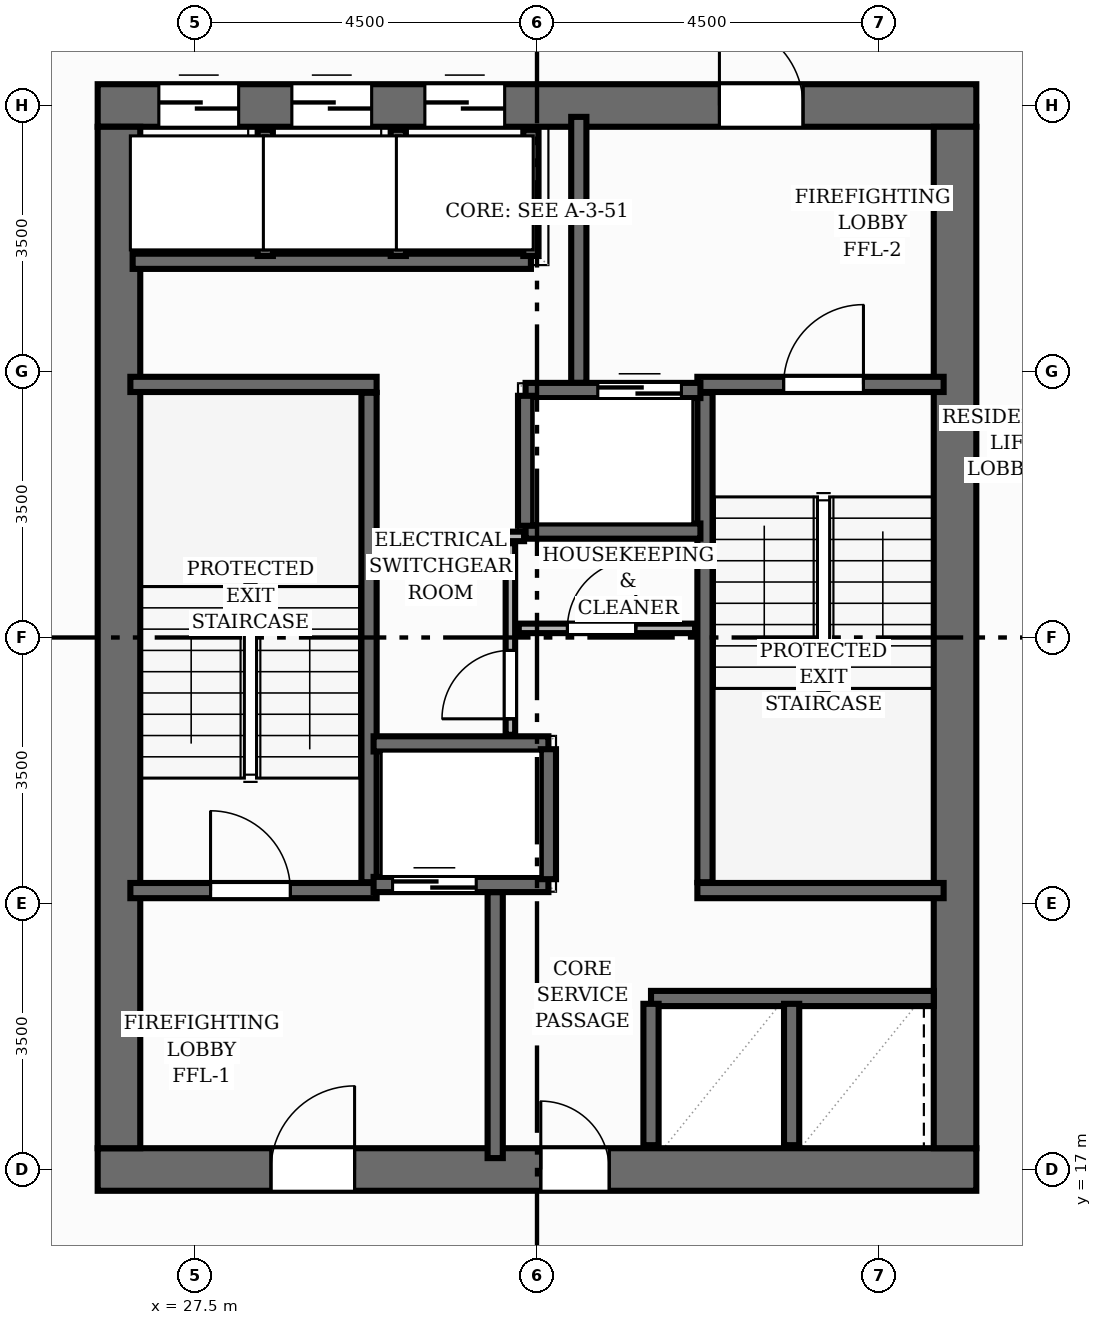
"""IFC4 building model, lengths in metres.
Left out: names, types, materials, properties, quantities, classifications, styles, units other than length and angle.
Written with IfcOpenShell. Run it as: python <this file> out.ifc"""

import sys

from ifc_helpers import new_model, si_unit, direction, frame, frame_2d, origin, place, context, subcontext, project, spatial, rectangle, extrude, element, fill, save


model = new_model("IFC4")
c1 = context("Model", 3, precision=1e-05, world=origin(), true_north=direction((0.0, 1.0)))
c2 = subcontext(c1, "Body", "Model", "MODEL_VIEW")
j1 = project(units=[si_unit("LENGTHUNIT", "METRE"), si_unit("PLANEANGLEUNIT", "RADIAN")], contexts=[c1])
p1 = place(None, origin())
s1 = spatial("IfcSite", under=j1, at=p1, CompositionType="ELEMENT")
p2 = place(p1, origin())
s2 = spatial("IfcBuilding", under=s1, at=p2, CompositionType="ELEMENT")
p3 = place(p2, frame((0.0, 0.0, 211.04)))
s3 = spatial("IfcBuildingStorey", under=s2, at=p3, CompositionType="ELEMENT", Elevation=211.04)
p4 = place(p3, frame((26.22, 17.0, 0.0), z_axis=(0.0, 0.0, 1.0), x_axis=(1.0, 0.0, 0.0)))
e1 = element("IfcWall", 1, at=p4, inside=s3, PredefinedType="SHEAR", context=c2, shape_type="SweptSolid", body=[
    extrude(rectangle(XDim=11.56, YDim=0.56, at=frame_2d((5.78, 0.0))), origin(), (0.0, 0.0, 1.0), 3.2),
])
p5 = place(p4, frame((2.28, 0.0, 0.0)))
e2 = element("IfcOpeningElement", 2, at=p5, cuts=e1, PredefinedType="OPENING", context=c2, shape_type="SweptSolid", body=[
    extrude(rectangle(XDim=1.1, YDim=2.15, at=frame_2d((0.55, 1.075))), frame((0.0, 0.29, 0.0), z_axis=(0.0, -1.0, 0.0), x_axis=(1.0, 0.0, 0.0)), (0.0, 0.0, 1.0), 0.58),
])
p6 = place(p4, frame((5.83, 0.0, 0.0)))
e3 = element("IfcOpeningElement", 3, at=p6, cuts=e1, PredefinedType="OPENING", context=c2, shape_type="SweptSolid", body=[
    extrude(rectangle(XDim=0.9, YDim=2.1, at=frame_2d((0.45, 1.05))), frame((0.0, 0.29, 0.0), z_axis=(0.0, -1.0, 0.0), x_axis=(1.0, 0.0, 0.0)), (0.0, 0.0, 1.0), 0.58),
])
p7 = place(p3, frame((26.22, 31.0, 0.0), z_axis=(0.0, 0.0, 1.0), x_axis=(1.0, 0.0, 0.0)))
e4 = element("IfcWall", 4, at=p7, inside=s3, PredefinedType="SHEAR", context=c2, shape_type="SweptSolid", body=[
    extrude(rectangle(XDim=11.56, YDim=0.56, at=frame_2d((5.78, 0.0))), origin(), (0.0, 0.0, 1.0), 3.2),
])
p8 = place(p7, frame((8.18, 0.0, 0.0)))
e5 = element("IfcOpeningElement", 5, at=p8, cuts=e4, PredefinedType="OPENING", context=c2, shape_type="SweptSolid", body=[
    extrude(rectangle(XDim=1.1, YDim=2.15, at=frame_2d((0.55, 1.075))), frame((0.0, 0.29, 0.0), z_axis=(0.0, -1.0, 0.0), x_axis=(1.0, 0.0, 0.0)), (0.0, 0.0, 1.0), 0.58),
])
p9 = place(p7, frame((0.805, 0.0, 0.0)))
e6 = element("IfcOpeningElement", 6, at=p9, cuts=e4, PredefinedType="OPENING", context=c2, shape_type="SweptSolid", body=[
    extrude(rectangle(XDim=1.05, YDim=2.15, at=frame_2d((0.525, 1.075))), frame((0.0, 0.29, 0.0), z_axis=(0.0, -1.0, 0.0), x_axis=(1.0, 0.0, 0.0)), (0.0, 0.0, 1.0), 0.58),
])
p10 = place(p7, frame((2.555, 0.0, 0.0)))
e7 = element("IfcOpeningElement", 7, at=p10, cuts=e4, PredefinedType="OPENING", context=c2, shape_type="SweptSolid", body=[
    extrude(rectangle(XDim=1.05, YDim=2.15, at=frame_2d((0.525, 1.075))), frame((0.0, 0.29, 0.0), z_axis=(0.0, -1.0, 0.0), x_axis=(1.0, 0.0, 0.0)), (0.0, 0.0, 1.0), 0.58),
])
p11 = place(p7, frame((4.305, 0.0, 0.0)))
e8 = element("IfcOpeningElement", 8, at=p11, cuts=e4, PredefinedType="OPENING", context=c2, shape_type="SweptSolid", body=[
    extrude(rectangle(XDim=1.05, YDim=2.15, at=frame_2d((0.525, 1.075))), frame((0.0, 0.29, 0.0), z_axis=(0.0, -1.0, 0.0), x_axis=(1.0, 0.0, 0.0)), (0.0, 0.0, 1.0), 0.58),
])
for number, where, z_axis, x_axis in (
    (9, (26.5, 17.28, 0.0), (0.0, 0.0, 1.0), (0.0, 1.0, 0.0)),
    (10, (37.5, 17.28, 0.0), (0.0, 0.0, 1.0), (0.0, 1.0, 0.0)),
):
    element("IfcWall", number, at=place(p3, frame(where, z_axis=z_axis, x_axis=x_axis)), inside=s3, PredefinedType="SHEAR", context=c2, shape_type="SweptSolid", body=[
        extrude(rectangle(XDim=13.44, YDim=0.56, at=frame_2d((6.72, 0.0))), origin(), (0.0, 0.0, 1.0), 3.2),
    ])
p12 = place(p3, frame((29.79, 20.78, 0.0), z_axis=(0.0, 0.0, 1.0), x_axis=(0.0, 1.0, 0.0)))
e11 = element("IfcWall", 11, at=p12, inside=s3, PredefinedType="SHEAR", context=c2, shape_type="SweptSolid", body=[
    extrude(rectangle(XDim=6.44, YDim=0.2, at=frame_2d((3.22, 0.0))), origin(), (0.0, 0.0, 1.0), 3.2),
])
p13 = place(p3, frame((26.65, 27.33, 0.0), z_axis=(0.0, 0.0, 1.0), x_axis=(1.0, 0.0, 0.0)))
e12 = element("IfcWall", 12, at=p13, inside=s3, PredefinedType="SHEAR", context=c2, shape_type="SweptSolid", body=[
    extrude(rectangle(XDim=3.24, YDim=0.2, at=frame_2d((1.62, 0.0))), origin(), (0.0, 0.0, 1.0), 3.2),
])
p14 = place(p3, frame((26.65, 20.67, 0.0), z_axis=(0.0, 0.0, 1.0), x_axis=(1.0, 0.0, 0.0)))
e13 = element("IfcWall", 13, at=p14, inside=s3, PredefinedType="SHEAR", context=c2, shape_type="SweptSolid", body=[
    extrude(rectangle(XDim=3.24, YDim=0.2, at=frame_2d((1.62, 0.0))), origin(), (0.0, 0.0, 1.0), 3.2),
])
p15 = place(p14, frame((1.055, 0.0, 0.0)))
e14 = element("IfcOpeningElement", 14, at=p15, cuts=e13, PredefinedType="OPENING", context=c2, shape_type="SweptSolid", body=[
    extrude(rectangle(XDim=1.05, YDim=2.15, at=frame_2d((0.525, 1.075))), frame((0.0, 0.11, 0.0), z_axis=(0.0, -1.0, 0.0), x_axis=(1.0, 0.0, 0.0)), (0.0, 0.0, 1.0), 0.22),
])
p16 = place(p3, frame((34.21, 20.78, 0.0), z_axis=(0.0, 0.0, 1.0), x_axis=(0.0, 1.0, 0.0)))
e15 = element("IfcWall", 15, at=p16, inside=s3, PredefinedType="SHEAR", context=c2, shape_type="SweptSolid", body=[
    extrude(rectangle(XDim=6.44, YDim=0.2, at=frame_2d((3.22, 0.0))), origin(), (0.0, 0.0, 1.0), 3.2),
])
p17 = place(p3, frame((34.11, 20.67, 0.0), z_axis=(0.0, 0.0, 1.0), x_axis=(1.0, 0.0, 0.0)))
e16 = element("IfcWall", 16, at=p17, inside=s3, PredefinedType="SHEAR", context=c2, shape_type="SweptSolid", body=[
    extrude(rectangle(XDim=3.24, YDim=0.2, at=frame_2d((1.62, 0.0))), origin(), (0.0, 0.0, 1.0), 3.2),
])
p18 = place(p3, frame((34.11, 27.33, 0.0), z_axis=(0.0, 0.0, 1.0), x_axis=(1.0, 0.0, 0.0)))
e17 = element("IfcWall", 17, at=p18, inside=s3, PredefinedType="SHEAR", context=c2, shape_type="SweptSolid", body=[
    extrude(rectangle(XDim=3.24, YDim=0.2, at=frame_2d((1.62, 0.0))), origin(), (0.0, 0.0, 1.0), 3.2),
])
p19 = place(p18, frame((1.135, 0.0, 0.0)))
e18 = element("IfcOpeningElement", 18, at=p19, cuts=e17, PredefinedType="OPENING", context=c2, shape_type="SweptSolid", body=[
    extrude(rectangle(XDim=1.05, YDim=2.15, at=frame_2d((0.525, 1.075))), frame((0.0, 0.11, 0.0), z_axis=(0.0, -1.0, 0.0), x_axis=(1.0, 0.0, 0.0)), (0.0, 0.0, 1.0), 0.22),
])
for number, where, z_axis, x_axis in (
    (19, (31.45, 17.15, 0.0), (0.0, 0.0, 1.0), (0.0, 1.0, 0.0)),
    (20, (32.55, 27.35, 0.0), (0.0, 0.0, 1.0), (0.0, 1.0, 0.0)),
):
    element("IfcWall", number, at=place(p3, frame(where, z_axis=z_axis, x_axis=x_axis)), inside=s3, PredefinedType="SHEAR", context=c2, shape_type="SweptSolid", body=[
        extrude(rectangle(XDim=3.5, YDim=0.2, at=frame_2d((1.75, 0.0))), origin(), (0.0, 0.0, 1.0), 3.2),
    ])
p20 = place(p3, frame((29.85, 20.75, 0.0), z_axis=(0.0, 0.0, 1.0), x_axis=(1.0, 0.0, 0.0)))
e21 = element("IfcWall", 21, at=p20, inside=s3, PredefinedType="SHEAR", context=c2, shape_type="SweptSolid", body=[
    extrude(rectangle(XDim=2.3, YDim=0.2, at=frame_2d((1.15, 0.0))), origin(), (0.0, 0.0, 1.0), 3.2),
])
p21 = place(p20, frame((0.25, 0.0, 0.0)))
e22 = element("IfcOpeningElement", 22, at=p21, cuts=e21, PredefinedType="OPENING", context=c2, shape_type="SweptSolid", body=[
    extrude(rectangle(XDim=1.1, YDim=2.15, at=frame_2d((0.55, 1.075))), frame((0.0, 0.11, 0.0), z_axis=(0.0, -1.0, 0.0), x_axis=(1.0, 0.0, 0.0)), (0.0, 0.0, 1.0), 0.22),
])
p22 = place(p3, frame((29.85, 22.6, 0.0), z_axis=(0.0, 0.0, 1.0), x_axis=(1.0, 0.0, 0.0)))
e23 = element("IfcWall", 23, at=p22, inside=s3, PredefinedType="SHEAR", context=c2, shape_type="SweptSolid", body=[
    extrude(rectangle(XDim=2.3, YDim=0.2, at=frame_2d((1.15, 0.0))), origin(), (0.0, 0.0, 1.0), 3.2),
])
p23 = place(p3, frame((32.15, 20.82, 0.0), z_axis=(0.0, 0.0, 1.0), x_axis=(0.0, 1.0, 0.0)))
e24 = element("IfcWall", 24, at=p23, inside=s3, PredefinedType="SHEAR", context=c2, shape_type="SweptSolid", body=[
    extrude(rectangle(XDim=1.71, YDim=0.2, at=frame_2d((0.855, 0.0))), origin(), (0.0, 0.0, 1.0), 3.2),
])
p24 = place(p3, frame((31.85, 27.25, 0.0), z_axis=(0.0, 0.0, 1.0), x_axis=(1.0, 0.0, 0.0)))
e25 = element("IfcWall", 25, at=p24, inside=s3, PredefinedType="SHEAR", context=c2, shape_type="SweptSolid", body=[
    extrude(rectangle(XDim=2.3, YDim=0.2, at=frame_2d((1.15, 0.0))), origin(), (0.0, 0.0, 1.0), 3.2),
])
p25 = place(p24, frame((0.95, 0.0, 0.0)))
e26 = element("IfcOpeningElement", 26, at=p25, cuts=e25, PredefinedType="OPENING", context=c2, shape_type="SweptSolid", body=[
    extrude(rectangle(XDim=1.1, YDim=2.15, at=frame_2d((0.55, 1.075))), frame((0.0, 0.11, 0.0), z_axis=(0.0, -1.0, 0.0), x_axis=(1.0, 0.0, 0.0)), (0.0, 0.0, 1.0), 0.22),
])
p26 = place(p3, frame((31.85, 25.4, 0.0), z_axis=(0.0, 0.0, 1.0), x_axis=(1.0, 0.0, 0.0)))
e27 = element("IfcWall", 27, at=p26, inside=s3, PredefinedType="SHEAR", context=c2, shape_type="SweptSolid", body=[
    extrude(rectangle(XDim=2.3, YDim=0.2, at=frame_2d((1.15, 0.0))), origin(), (0.0, 0.0, 1.0), 3.2),
])
p27 = place(p3, frame((31.85, 25.47, 0.0), z_axis=(0.0, 0.0, 1.0), x_axis=(0.0, 1.0, 0.0)))
e28 = element("IfcWall", 28, at=p27, inside=s3, PredefinedType="SHEAR", context=c2, shape_type="SweptSolid", body=[
    extrude(rectangle(XDim=1.71, YDim=0.2, at=frame_2d((0.855, 0.0))), origin(), (0.0, 0.0, 1.0), 3.2),
])
p28 = place(p3, frame((26.68, 28.95, 0.0), z_axis=(0.0, 0.0, 1.0), x_axis=(1.0, 0.0, 0.0)))
e29 = element("IfcWall", 29, at=p28, inside=s3, PredefinedType="SHEAR", context=c2, shape_type="SweptSolid", body=[
    extrude(rectangle(XDim=5.24, YDim=0.2, at=frame_2d((2.62, 0.0))), origin(), (0.0, 0.0, 1.0), 3.2),
])
for number, where, z_axis, x_axis in (
    (30, (31.92, 29.02, 0.0), (0.0, 0.0, 1.0), (0.0, 1.0, 0.0)),
    (31, (28.425, 29.02, 0.0), (0.0, 0.0, 1.0), (0.0, 1.0, 0.0)),
    (32, (30.175, 29.02, 0.0), (0.0, 0.0, 1.0), (0.0, 1.0, 0.0)),
):
    element("IfcWall", number, at=place(p3, frame(where, z_axis=z_axis, x_axis=x_axis)), inside=s3, PredefinedType="SHEAR", context=c2, shape_type="SweptSolid", body=[
        extrude(rectangle(XDim=1.66, YDim=0.2, at=frame_2d((0.83, 0.0))), origin(), (0.0, 0.0, 1.0), 3.2),
    ])
p29 = place(p3, frame((33.5, 19.25, 0.0), z_axis=(0.0, 0.0, 1.0), x_axis=(1.0, 0.0, 0.0)))
e33 = element("IfcWall", 33, at=p29, inside=s3, PredefinedType="SHEAR", context=c2, shape_type="SweptSolid", body=[
    extrude(rectangle(XDim=3.72, YDim=0.2, at=frame_2d((1.86, 0.0))), origin(), (0.0, 0.0, 1.0), 3.2),
])
for number, where, z_axis, x_axis in (
    (34, (33.5, 17.32, 0.0), (0.0, 0.0, 1.0), (0.0, 1.0, 0.0)),
    (35, (35.35, 17.32, 0.0), (0.0, 0.0, 1.0), (0.0, 1.0, 0.0)),
):
    element("IfcWall", number, at=place(p3, frame(where, z_axis=z_axis, x_axis=x_axis)), inside=s3, PredefinedType="SHEAR", context=c2, shape_type="SweptSolid", body=[
        extrude(rectangle(XDim=1.86, YDim=0.2, at=frame_2d((0.93, 0.0))), origin(), (0.0, 0.0, 1.0), 3.2),
    ])
p30 = place(p3, frame((31.65, 22.72, 0.0), z_axis=(0.0, 0.0, 1.0), x_axis=(0.0, 1.0, 0.0)))
e36 = element("IfcWall", 36, at=p30, inside=s3, PredefinedType="PARTITIONING", context=c2, shape_type="SweptSolid", body=[
    extrude(rectangle(XDim=2.52, YDim=0.125, at=frame_2d((1.26, 0.0))), origin(), (0.0, 0.0, 1.0), 2.955),
])
p31 = place(p30, frame((0.21, 0.0, 0.0)))
e37 = element("IfcOpeningElement", 37, at=p31, cuts=e36, PredefinedType="OPENING", context=c2, shape_type="SweptSolid", body=[
    extrude(rectangle(XDim=0.9, YDim=2.1, at=frame_2d((0.45, 1.05))), frame((0.0, 0.073, 0.0), z_axis=(0.0, -1.0, 0.0), x_axis=(1.0, 0.0, 0.0)), (0.0, 0.0, 1.0), 0.145),
])
p32 = place(p3, frame((31.76, 24.12, 0.0), z_axis=(0.0, 0.0, 1.0), x_axis=(1.0, 0.0, 0.0)))
e38 = element("IfcWall", 38, at=p32, inside=s3, PredefinedType="PARTITIONING", context=c2, shape_type="SweptSolid", body=[
    extrude(rectangle(XDim=2.32, YDim=0.125, at=frame_2d((1.16, 0.0))), origin(), (0.0, 0.0, 1.0), 2.955),
])
p33 = place(p32, frame((0.64, 0.0, 0.0)))
e39 = element("IfcOpeningElement", 39, at=p33, cuts=e38, PredefinedType="OPENING", context=c2, shape_type="SweptSolid", body=[
    extrude(rectangle(XDim=0.9, YDim=2.1, at=frame_2d((0.45, 1.05))), frame((0.0, 0.073, 0.0), z_axis=(0.0, -1.0, 0.0), x_axis=(1.0, 0.0, 0.0)), (0.0, 0.0, 1.0), 0.145),
])
p34 = place(p3, frame((29.89, 25.33, 0.0), z_axis=(0.0, 0.0, 1.0), x_axis=(1.0, 0.0, 0.0)))
e40 = element("IfcWall", 40, at=p34, inside=s3, PredefinedType="PARTITIONING", context=c2, shape_type="SweptSolid", body=[
    extrude(rectangle(XDim=1.94, YDim=0.125, at=frame_2d((0.97, 0.0))), origin(), (0.0, 0.0, 1.0), 2.955),
])
p35 = place(p15, origin())
e41 = element("IfcDoor", 41, at=p35, inside=s3, OperationType="SINGLE_SWING_LEFT", PredefinedType="DOOR", context=c2, shape_type="SweptSolid", body=[
    extrude(rectangle(XDim=1.05, YDim=2.15, at=frame_2d((0.525, 1.075))), frame((0.0, 0.025, 0.0), z_axis=(0.0, -1.0, 0.0), x_axis=(1.0, 0.0, 0.0)), (0.0, 0.0, 1.0), 0.05),
])
fill(e14, e41)
p36 = place(p19, origin())
e42 = element("IfcDoor", 42, at=p36, inside=s3, OperationType="SINGLE_SWING_RIGHT", PredefinedType="DOOR", context=c2, shape_type="SweptSolid", body=[
    extrude(rectangle(XDim=1.05, YDim=2.15, at=frame_2d((0.525, 1.075))), frame((0.0, 0.025, 0.0), z_axis=(0.0, -1.0, 0.0), x_axis=(1.0, 0.0, 0.0)), (0.0, 0.0, 1.0), 0.05),
])
fill(e18, e42)
p37 = place(p5, origin())
e43 = element("IfcDoor", 43, at=p37, inside=s3, OperationType="SINGLE_SWING_RIGHT", PredefinedType="DOOR", context=c2, shape_type="SweptSolid", body=[
    extrude(rectangle(XDim=1.1, YDim=2.15, at=frame_2d((0.55, 1.075))), frame((0.0, 0.025, 0.0), z_axis=(0.0, -1.0, 0.0), x_axis=(1.0, 0.0, 0.0)), (0.0, 0.0, 1.0), 0.05),
])
fill(e2, e43)
p38 = place(p8, origin())
e44 = element("IfcDoor", 44, at=p38, inside=s3, OperationType="SINGLE_SWING_LEFT", PredefinedType="DOOR", context=c2, shape_type="SweptSolid", body=[
    extrude(rectangle(XDim=1.1, YDim=2.15, at=frame_2d((0.55, 1.075))), frame((0.0, 0.025, 0.0), z_axis=(0.0, -1.0, 0.0), x_axis=(1.0, 0.0, 0.0)), (0.0, 0.0, 1.0), 0.05),
])
fill(e5, e44)
p39 = place(p21, origin())
e45 = element("IfcDoor", 45, at=p39, inside=s3, OperationType="DOUBLE_DOOR_SLIDING", PredefinedType="DOOR", context=c2, shape_type="SweptSolid", body=[
    extrude(rectangle(XDim=1.1, YDim=2.15, at=frame_2d((0.55, 1.075))), frame((0.0, 0.025, 0.0), z_axis=(0.0, -1.0, 0.0), x_axis=(1.0, 0.0, 0.0)), (0.0, 0.0, 1.0), 0.05),
])
fill(e22, e45)
p40 = place(p25, origin())
e46 = element("IfcDoor", 46, at=p40, inside=s3, OperationType="DOUBLE_DOOR_SLIDING", PredefinedType="DOOR", context=c2, shape_type="SweptSolid", body=[
    extrude(rectangle(XDim=1.1, YDim=2.15, at=frame_2d((0.55, 1.075))), frame((0.0, 0.025, 0.0), z_axis=(0.0, -1.0, 0.0), x_axis=(1.0, 0.0, 0.0)), (0.0, 0.0, 1.0), 0.05),
])
fill(e26, e46)
p41 = place(p9, origin())
e47 = element("IfcDoor", 47, at=p41, inside=s3, OperationType="DOUBLE_DOOR_SLIDING", PredefinedType="DOOR", context=c2, shape_type="SweptSolid", body=[
    extrude(rectangle(XDim=1.05, YDim=2.15, at=frame_2d((0.525, 1.075))), frame((0.0, 0.025, 0.0), z_axis=(0.0, -1.0, 0.0), x_axis=(1.0, 0.0, 0.0)), (0.0, 0.0, 1.0), 0.05),
])
fill(e6, e47)
p42 = place(p10, origin())
e48 = element("IfcDoor", 48, at=p42, inside=s3, OperationType="DOUBLE_DOOR_SLIDING", PredefinedType="DOOR", context=c2, shape_type="SweptSolid", body=[
    extrude(rectangle(XDim=1.05, YDim=2.15, at=frame_2d((0.525, 1.075))), frame((0.0, 0.025, 0.0), z_axis=(0.0, -1.0, 0.0), x_axis=(1.0, 0.0, 0.0)), (0.0, 0.0, 1.0), 0.05),
])
fill(e7, e48)
p43 = place(p11, origin())
e49 = element("IfcDoor", 49, at=p43, inside=s3, OperationType="DOUBLE_DOOR_SLIDING", PredefinedType="DOOR", context=c2, shape_type="SweptSolid", body=[
    extrude(rectangle(XDim=1.05, YDim=2.15, at=frame_2d((0.525, 1.075))), frame((0.0, 0.025, 0.0), z_axis=(0.0, -1.0, 0.0), x_axis=(1.0, 0.0, 0.0)), (0.0, 0.0, 1.0), 0.05),
])
fill(e8, e49)
p44 = place(p6, origin())
e50 = element("IfcDoor", 50, at=p44, inside=s3, OperationType="SINGLE_SWING_LEFT", PredefinedType="DOOR", context=c2, shape_type="SweptSolid", body=[
    extrude(rectangle(XDim=0.9, YDim=2.1, at=frame_2d((0.45, 1.05))), frame((0.0, 0.025, 0.0), z_axis=(0.0, -1.0, 0.0), x_axis=(1.0, 0.0, 0.0)), (0.0, 0.0, 1.0), 0.05),
])
fill(e3, e50)
p45 = place(p31, origin())
e51 = element("IfcDoor", 51, at=p45, inside=s3, OperationType="SINGLE_SWING_LEFT", PredefinedType="DOOR", context=c2, shape_type="SweptSolid", body=[
    extrude(rectangle(XDim=0.9, YDim=2.1, at=frame_2d((0.45, 1.05))), frame((0.0, 0.025, 0.0), z_axis=(0.0, -1.0, 0.0), x_axis=(1.0, 0.0, 0.0)), (0.0, 0.0, 1.0), 0.05),
])
fill(e37, e51)
p46 = place(p33, origin())
e52 = element("IfcDoor", 52, at=p46, inside=s3, OperationType="SINGLE_SWING_RIGHT", PredefinedType="DOOR", context=c2, shape_type="SweptSolid", body=[
    extrude(rectangle(XDim=0.9, YDim=2.1, at=frame_2d((0.45, 1.05))), frame((0.0, 0.025, 0.0), z_axis=(0.0, -1.0, 0.0), x_axis=(1.0, 0.0, 0.0)), (0.0, 0.0, 1.0), 0.05),
])
fill(e39, e52)
save(model, sys.argv[1])
